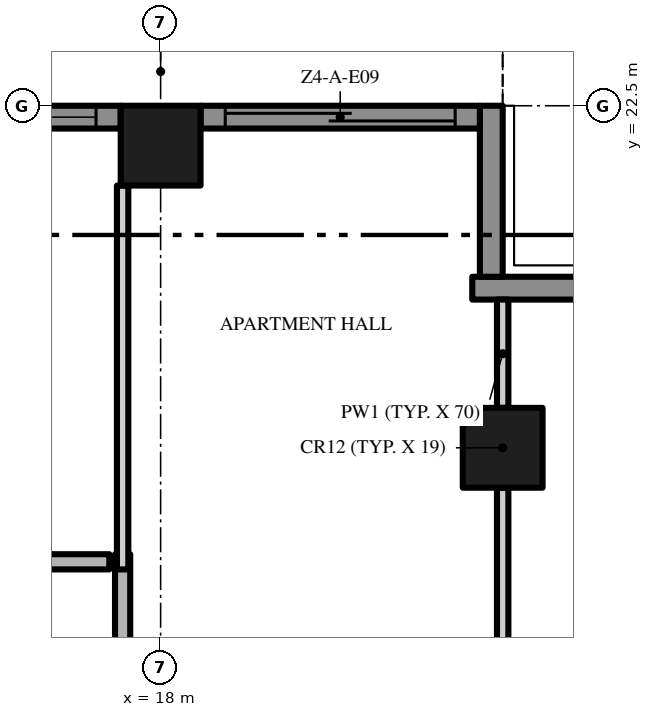
"""IFC4 building model, lengths in metres.
Left out: names, types, materials, properties, quantities, classifications, styles, units other than length and angle.
Written with IfcOpenShell. Run it as: python <this file> out.ifc"""

import sys

from ifc_helpers import new_model, si_unit, direction, frame, frame_2d, origin, origin_2d, place, context, subcontext, project, spatial, polyline, rectangle, outline, extrude, element, fill, save


model = new_model("IFC4")
c1 = context("Model", 3, precision=1e-05, world=origin(), true_north=direction((0.0, 1.0)))
c2 = subcontext(c1, "Body", "Model", "MODEL_VIEW")
j1 = project(units=[si_unit("LENGTHUNIT", "METRE"), si_unit("PLANEANGLEUNIT", "RADIAN")], contexts=[c1])
p1 = place(None, origin())
s1 = spatial("IfcSite", under=j1, at=p1, CompositionType="ELEMENT")
p2 = place(p1, origin())
s2 = spatial("IfcBuilding", under=s1, at=p2, CompositionType="ELEMENT")
p3 = place(p2, frame((0.0, 0.0, 184.4)))
s3 = spatial("IfcBuildingStorey", under=s2, at=p3, CompositionType="ELEMENT", Elevation=184.4)
for number, where, z_axis, x_axis in (
    (1, (18.0, 21.975, 0.0), (0.0, 0.0, 1.0), (1.0, 0.0, 0.0)),
    (2, (22.5, 18.0, 0.0), (0.0, 0.0, 1.0), (1.0, 0.0, 0.0)),
):
    element("IfcColumn", number, at=place(p3, frame(where, z_axis=z_axis, x_axis=x_axis)), inside=s3, PredefinedType="COLUMN", context=c2, shape_type="SweptSolid", body=[
        extrude(rectangle(XDim=1.05, YDim=1.05, at=origin_2d()), origin(), (0.0, 0.0, 1.0), 3.5),
    ])
p4 = place(p3, frame((22.1, 20.1, 0.0), z_axis=(0.0, 0.0, 1.0), x_axis=(1.0, 0.0, 0.0)))
e3 = element("IfcWall", 3, at=p4, inside=s3, PredefinedType="SOLIDWALL", context=c2, shape_type="SweptSolid", body=[
    extrude(rectangle(XDim=2.35, YDim=0.3, at=frame_2d((1.175, 0.0))), origin(), (0.0, 0.0, 1.0), 3.5),
])
p5 = place(p3, frame((22.35, 22.5, 0.0), z_axis=(0.0, 0.0, 1.0), x_axis=(0.0, -1.0, 0.0)))
e4 = element("IfcWall", 4, at=p5, inside=s3, PredefinedType="SOLIDWALL", context=c2, shape_type="SweptSolid", body=[
    extrude(rectangle(XDim=2.25, YDim=0.3, at=frame_2d((1.125, 0.0))), origin(), (0.0, 0.0, 1.0), 3.5),
])
p6 = place(p3, frame((18.525, 22.35, 0.0), z_axis=(0.0, 0.0, 1.0), x_axis=(1.0, 0.0, 0.0)))
e5 = element("IfcWall", 5, at=p6, inside=s3, PredefinedType="SOLIDWALL", context=c2, shape_type="SweptSolid", body=[
    extrude(rectangle(XDim=3.675, YDim=0.3, at=frame_2d((1.837, 0.0))), origin(), (0.0, 0.0, 1.0), 3.5),
])
p7 = place(p6, frame((0.325, 0.0, 0.0)))
e6 = element("IfcOpeningElement", 6, at=p7, cuts=e5, PredefinedType="OPENING", context=c2, shape_type="SweptSolid", body=[
    extrude(rectangle(XDim=3.025, YDim=2.4, at=frame_2d((1.512, 1.2))), frame((0.0, 0.16, 0.0), z_axis=(0.0, -1.0, 0.0), x_axis=(1.0, 0.0, 0.0)), (0.0, 0.0, 1.0), 0.32),
])
p8 = place(p3, frame((13.5, 22.35, 0.0), z_axis=(0.0, 0.0, 1.0), x_axis=(1.0, 0.0, 0.0)))
e7 = element("IfcWall", 7, at=p8, inside=s3, PredefinedType="SOLIDWALL", context=c2, shape_type="SweptSolid", body=[
    extrude(rectangle(XDim=3.975, YDim=0.3, at=frame_2d((1.988, 0.0))), origin(), (0.0, 0.0, 1.0), 3.5),
])
p9 = place(p8, frame((0.625, 0.0, 0.45)))
e8 = element("IfcOpeningElement", 8, at=p9, cuts=e7, PredefinedType="OPENING", context=c2, shape_type="SweptSolid", body=[
    extrude(rectangle(XDim=3.025, YDim=2.65, at=frame_2d((1.512, 1.325))), frame((0.0, 0.16, 0.0), z_axis=(0.0, -1.0, 0.0), x_axis=(1.0, 0.0, 0.0)), (0.0, 0.0, 1.0), 0.32),
])
p10 = place(p3, origin())
e9 = element("IfcWall", 9, at=p10, inside=s3, PredefinedType="USERDEFINED", context=c2, shape_type="SweptSolid", body=[
    extrude(outline(polyline([(22.5, 25.149), (21.0, 25.485), (20.625, 25.5), (19.5, 25.369), (18.0, 24.845), (16.5, 24.112), (15.0, 23.451), (13.5, 23.115), (13.555, 22.871), (15.079, 23.213), (16.605, 23.885), (18.096, 24.614), (19.556, 25.124), (20.635, 25.249), (20.967, 25.236), (22.445, 24.905), (22.5, 25.149)])), origin(), (0.0, 0.0, 1.0), 0.9),
])
p11 = place(p3, frame((13.5, 16.5, 0.0), z_axis=(0.0, 0.0, 1.0), x_axis=(1.0, 0.0, 0.0)))
e10 = element("IfcWall", 10, at=p11, inside=s3, PredefinedType="PARTITIONING", context=c2, shape_type="SweptSolid", body=[
    extrude(rectangle(XDim=3.825, YDim=0.2, at=frame_2d((1.913, 0.0))), origin(), (0.0, 0.0, 1.0), 3.5),
])
p12 = place(p11, frame((1.55, 0.0, 0.0)))
e11 = element("IfcOpeningElement", 11, at=p12, cuts=e10, PredefinedType="OPENING", context=c2, shape_type="SweptSolid", body=[
    extrude(rectangle(XDim=0.9, YDim=2.1, at=frame_2d((0.45, 1.05))), frame((0.0, 0.11, 0.0), z_axis=(0.0, -1.0, 0.0), x_axis=(1.0, 0.0, 0.0)), (0.0, 0.0, 1.0), 0.22),
])
p13 = place(p3, frame((17.5, 16.6, 0.0), z_axis=(0.0, 0.0, 1.0), x_axis=(0.0, -1.0, 0.0)))
e12 = element("IfcWall", 12, at=p13, inside=s3, PredefinedType="PARTITIONING", context=c2, shape_type="SweptSolid", body=[
    extrude(rectangle(XDim=2.525, YDim=0.2, at=frame_2d((1.262, 0.0))), origin(), (0.0, 0.0, 1.0), 3.5),
])
p14 = place(p13, frame((1.175, 0.0, 0.0)))
e13 = element("IfcOpeningElement", 13, at=p14, cuts=e12, PredefinedType="OPENING", context=c2, shape_type="SweptSolid", body=[
    extrude(rectangle(XDim=1.2, YDim=2.4, at=frame_2d((0.6, 1.2))), frame((0.0, 0.11, 0.0), z_axis=(0.0, -1.0, 0.0), x_axis=(1.0, 0.0, 0.0)), (0.0, 0.0, 1.0), 0.22),
])
p15 = place(p3, frame((17.5, 16.4, 0.0), z_axis=(0.0, 0.0, 1.0), x_axis=(0.0, 1.0, 0.0)))
e14 = element("IfcWall", 14, at=p15, inside=s3, PredefinedType="PARTITIONING", context=c2, shape_type="SweptSolid", body=[
    extrude(rectangle(XDim=5.05, YDim=0.15, at=frame_2d((2.525, 0.0))), origin(), (0.0, 0.0, 1.0), 3.5),
])
p16 = place(p3, frame((22.5, 17.475, 0.0), z_axis=(0.0, 0.0, 1.0), x_axis=(0.0, -1.0, 0.0)))
e15 = element("IfcWall", 15, at=p16, inside=s3, PredefinedType="PARTITIONING", context=c2, shape_type="SweptSolid", body=[
    extrude(rectangle(XDim=17.375, YDim=0.15, at=frame_2d((8.688, 0.0))), origin(), (0.0, 0.0, 1.0), 3.5),
])
p17 = place(p16, frame((14.725, 0.0, 0.0)))
e16 = element("IfcOpeningElement", 16, at=p17, cuts=e15, PredefinedType="OPENING", context=c2, shape_type="SweptSolid", body=[
    extrude(rectangle(XDim=1.0, YDim=2.4, at=frame_2d((0.5, 1.2))), frame((0.0, 0.085, 0.0), z_axis=(0.0, -1.0, 0.0), x_axis=(1.0, 0.0, 0.0)), (0.0, 0.0, 1.0), 0.17),
])
p18 = place(p16, frame((9.125, 0.0, 0.0)))
e17 = element("IfcOpeningElement", 17, at=p18, cuts=e15, PredefinedType="OPENING", context=c2, shape_type="SweptSolid", body=[
    extrude(rectangle(XDim=1.0, YDim=2.4, at=frame_2d((0.5, 1.2))), frame((0.0, 0.085, 0.0), z_axis=(0.0, -1.0, 0.0), x_axis=(1.0, 0.0, 0.0)), (0.0, 0.0, 1.0), 0.17),
])
p19 = place(p16, frame((2.325, 0.0, 0.0)))
e18 = element("IfcOpeningElement", 18, at=p19, cuts=e15, PredefinedType="OPENING", context=c2, shape_type="SweptSolid", body=[
    extrude(rectangle(XDim=1.8, YDim=2.4, at=frame_2d((0.9, 1.2))), frame((0.0, 0.085, 0.0), z_axis=(0.0, -1.0, 0.0), x_axis=(1.0, 0.0, 0.0)), (0.0, 0.0, 1.0), 0.17),
])
p20 = place(p3, frame((22.5, 18.525, 0.0), z_axis=(0.0, 0.0, 1.0), x_axis=(0.0, 1.0, 0.0)))
e19 = element("IfcWall", 19, at=p20, inside=s3, PredefinedType="PARTITIONING", context=c2, shape_type="SweptSolid", body=[
    extrude(rectangle(XDim=1.425, YDim=0.15, at=frame_2d((0.713, 0.0))), origin(), (0.0, 0.0, 1.0), 3.5),
])
p21 = place(p7, origin())
e20 = element("IfcDoor", 20, at=p21, inside=s3, OperationType="SINGLE_SWING_LEFT", PredefinedType="DOOR", context=c2, shape_type="SweptSolid", body=[
    extrude(rectangle(XDim=3.025, YDim=2.4, at=frame_2d((1.512, 1.2))), frame((0.0, 0.025, 0.0), z_axis=(0.0, -1.0, 0.0), x_axis=(1.0, 0.0, 0.0)), (0.0, 0.0, 1.0), 0.05),
])
fill(e6, e20)
p22 = place(p9, origin())
e21 = element("IfcWindow", 21, at=p22, inside=s3, PartitioningType="SINGLE_PANEL", PredefinedType="WINDOW", context=c2, shape_type="SweptSolid", body=[
    extrude(rectangle(XDim=3.025, YDim=2.65, at=frame_2d((1.512, 1.325))), frame((0.0, 0.03, 0.0), z_axis=(0.0, -1.0, 0.0), x_axis=(1.0, 0.0, 0.0)), (0.0, 0.0, 1.0), 0.06),
])
fill(e8, e21)
save(model, sys.argv[1])
